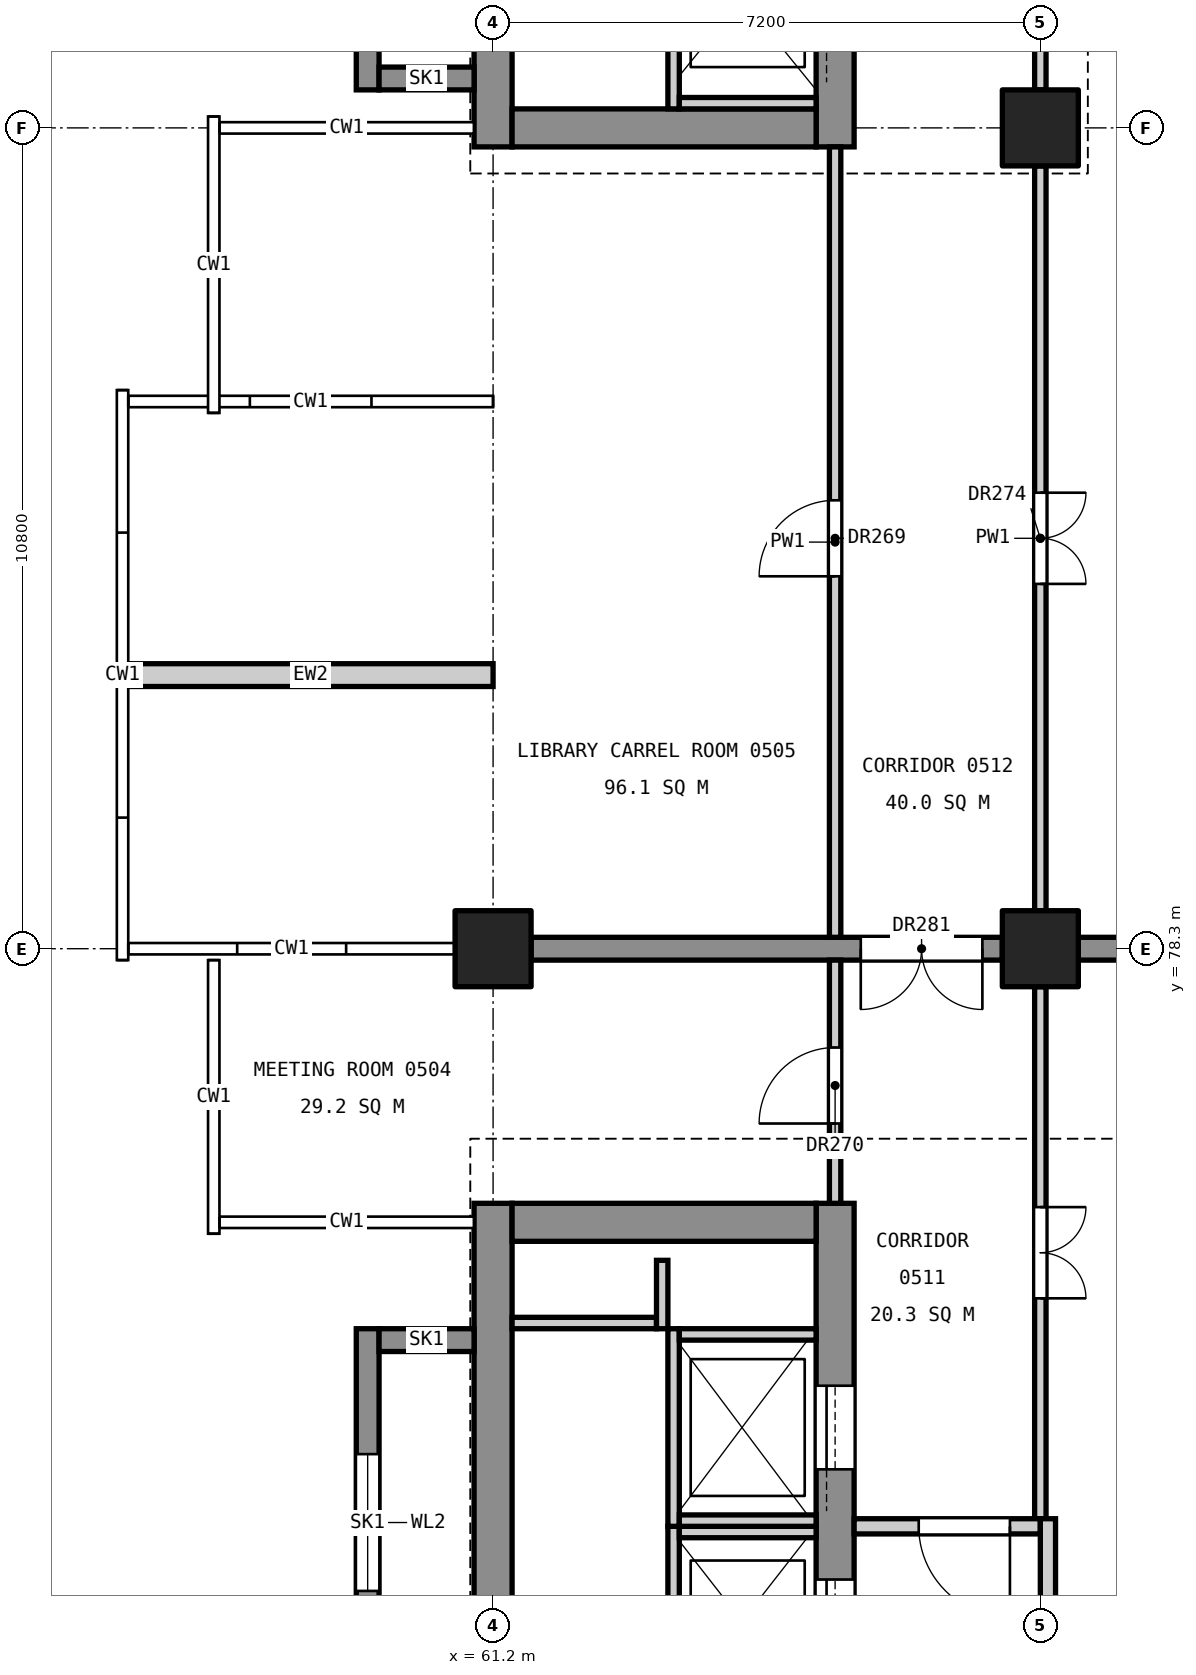
"""IFC4 building model, lengths in metres.
Left out: names, types, materials, properties, quantities, classifications, styles, units other than length and angle.
Written with IfcOpenShell. Run it as: python <this file> out.ifc"""

import sys

from ifc_helpers import new_model, si_unit, direction, frame, frame_2d, origin, origin_2d, place, context, subcontext, project, spatial, rectangle, extrude, element, fill, save


model = new_model("IFC4")
c1 = context("Model", 3, precision=1e-05, world=origin(), true_north=direction((0.0, 1.0)))
c2 = subcontext(c1, "Body", "Model", "MODEL_VIEW")
j1 = project(units=[si_unit("LENGTHUNIT", "METRE"), si_unit("PLANEANGLEUNIT", "RADIAN")], contexts=[c1])
p1 = place(None, origin())
s1 = spatial("IfcSite", under=j1, at=p1, CompositionType="ELEMENT")
p2 = place(p1, origin())
s2 = spatial("IfcBuilding", under=s1, at=p2, CompositionType="ELEMENT")
p3 = place(p2, frame((0.0, 0.0, 27.0)))
s3 = spatial("IfcBuildingStorey", under=s2, at=p3, CompositionType="ELEMENT", Elevation=27.0)
for number, where, z_axis, x_axis in (
    (1, (61.2, 78.3, 0.0), (0.0, 0.0, 1.0), (1.0, 0.0, 0.0)),
    (2, (68.4, 78.3, 0.0), (0.0, 0.0, 1.0), (1.0, 0.0, 0.0)),
    (3, (68.4, 89.1, 0.0), (0.0, 0.0, 1.0), (1.0, 0.0, 0.0)),
):
    element("IfcColumn", number, at=place(p3, frame(where, z_axis=z_axis, x_axis=x_axis)), inside=s3, PredefinedType="COLUMN", context=c2, shape_type="SweptSolid", body=[
        extrude(rectangle(XDim=1.0, YDim=1.0, at=origin_2d()), origin(), (0.0, 0.0, 1.0), 4.8),
    ])
p4 = place(p3, frame((61.2, 60.05, 0.0), z_axis=(0.0, 0.0, 1.0), x_axis=(0.0, 1.0, 0.0)))
e4 = element("IfcWall", 4, at=p4, inside=s3, PredefinedType="SHEAR", context=c2, shape_type="SweptSolid", body=[
    extrude(rectangle(XDim=14.9, YDim=0.5, at=frame_2d((7.45, 0.0))), origin(), (0.0, 0.0, 1.0), 4.55),
])
p5 = place(p4, frame((6.16, 0.0, 3.4)))
e5 = element("IfcOpeningElement", 5, at=p5, cuts=e4, PredefinedType="OPENING", context=c2, shape_type="SweptSolid", body=[
    extrude(rectangle(XDim=1.2, YDim=0.9, at=frame_2d((0.6, 0.45))), frame((0.0, 0.26, 0.0), z_axis=(0.0, -1.0, 0.0), x_axis=(1.0, 0.0, 0.0)), (0.0, 0.0, 1.0), 0.52),
])
p6 = place(p3, frame((65.7, 60.05, 0.0), z_axis=(0.0, 0.0, 1.0), x_axis=(0.0, 1.0, 0.0)))
e6 = element("IfcWall", 6, at=p6, inside=s3, PredefinedType="SHEAR", context=c2, shape_type="SweptSolid", body=[
    extrude(rectangle(XDim=14.9, YDim=0.5, at=frame_2d((7.45, 0.0))), origin(), (0.0, 0.0, 1.0), 4.55),
])
p7 = place(p6, frame((0.55, 0.0, 0.0)))
e7 = element("IfcOpeningElement", 7, at=p7, cuts=e6, PredefinedType="OPENING", context=c2, shape_type="SweptSolid", body=[
    extrude(rectangle(XDim=1.4, YDim=2.1, at=frame_2d((0.7, 1.05))), frame((0.0, 0.26, 0.0), z_axis=(0.0, -1.0, 0.0), x_axis=(1.0, 0.0, 0.0)), (0.0, 0.0, 1.0), 0.52),
])
p8 = place(p6, frame((8.85, 0.0, 0.0)))
e8 = element("IfcOpeningElement", 8, at=p8, cuts=e6, PredefinedType="OPENING", context=c2, shape_type="SweptSolid", body=[
    extrude(rectangle(XDim=1.1, YDim=2.1, at=frame_2d((0.55, 1.05))), frame((0.0, 0.26, 0.0), z_axis=(0.0, -1.0, 0.0), x_axis=(1.0, 0.0, 0.0)), (0.0, 0.0, 1.0), 0.52),
])
p9 = place(p6, frame((11.4, 0.0, 0.0)))
e9 = element("IfcOpeningElement", 9, at=p9, cuts=e6, PredefinedType="OPENING", context=c2, shape_type="SweptSolid", body=[
    extrude(rectangle(XDim=1.1, YDim=2.1, at=frame_2d((0.55, 1.05))), frame((0.0, 0.26, 0.0), z_axis=(0.0, -1.0, 0.0), x_axis=(1.0, 0.0, 0.0)), (0.0, 0.0, 1.0), 0.52),
])
p10 = place(p3, frame((61.45, 74.7, 0.0), z_axis=(0.0, 0.0, 1.0), x_axis=(1.0, 0.0, 0.0)))
e10 = element("IfcWall", 10, at=p10, inside=s3, PredefinedType="SHEAR", context=c2, shape_type="SweptSolid", body=[
    extrude(rectangle(XDim=4.0, YDim=0.5, at=frame_2d((2.0, 0.0))), origin(), (0.0, 0.0, 1.0), 4.55),
])
p11 = place(p3, frame((61.2, 88.85, 0.0), z_axis=(0.0, 0.0, 1.0), x_axis=(0.0, 1.0, 0.0)))
e11 = element("IfcWall", 11, at=p11, inside=s3, PredefinedType="SHEAR", context=c2, shape_type="SweptSolid", body=[
    extrude(rectangle(XDim=11.3, YDim=0.5, at=frame_2d((5.65, 0.0))), origin(), (0.0, 0.0, 1.0), 4.55),
])
p12 = place(p11, frame((3.94, 0.0, 3.4)))
e12 = element("IfcOpeningElement", 12, at=p12, cuts=e11, PredefinedType="OPENING", context=c2, shape_type="SweptSolid", body=[
    extrude(rectangle(XDim=1.2, YDim=0.9, at=frame_2d((0.6, 0.45))), frame((0.0, 0.26, 0.0), z_axis=(0.0, -1.0, 0.0), x_axis=(1.0, 0.0, 0.0)), (0.0, 0.0, 1.0), 0.52),
])
p13 = place(p3, frame((65.7, 88.85, 0.0), z_axis=(0.0, 0.0, 1.0), x_axis=(0.0, 1.0, 0.0)))
e13 = element("IfcWall", 13, at=p13, inside=s3, PredefinedType="SHEAR", context=c2, shape_type="SweptSolid", body=[
    extrude(rectangle(XDim=11.3, YDim=0.5, at=frame_2d((5.65, 0.0))), origin(), (0.0, 0.0, 1.0), 4.55),
])
p14 = place(p13, frame((9.35, 0.0, 0.0)))
e14 = element("IfcOpeningElement", 14, at=p14, cuts=e13, PredefinedType="OPENING", context=c2, shape_type="SweptSolid", body=[
    extrude(rectangle(XDim=1.4, YDim=2.1, at=frame_2d((0.7, 1.05))), frame((0.0, 0.26, 0.0), z_axis=(0.0, -1.0, 0.0), x_axis=(1.0, 0.0, 0.0)), (0.0, 0.0, 1.0), 0.52),
])
p15 = place(p13, frame((1.4, 0.0, 0.0)))
e15 = element("IfcOpeningElement", 15, at=p15, cuts=e13, PredefinedType="OPENING", context=c2, shape_type="SweptSolid", body=[
    extrude(rectangle(XDim=1.1, YDim=2.1, at=frame_2d((0.55, 1.05))), frame((0.0, 0.26, 0.0), z_axis=(0.0, -1.0, 0.0), x_axis=(1.0, 0.0, 0.0)), (0.0, 0.0, 1.0), 0.52),
])
p16 = place(p3, frame((61.45, 89.1, 0.0), z_axis=(0.0, 0.0, 1.0), x_axis=(1.0, 0.0, 0.0)))
e16 = element("IfcWall", 16, at=p16, inside=s3, PredefinedType="SHEAR", context=c2, shape_type="SweptSolid", body=[
    extrude(rectangle(XDim=4.0, YDim=0.5, at=frame_2d((2.0, 0.0))), origin(), (0.0, 0.0, 1.0), 4.55),
])
p17 = place(p3, frame((59.55, 68.2, 0.0), z_axis=(0.0, 0.0, 1.0), x_axis=(0.0, 1.0, 0.0)))
e17 = element("IfcWall", 17, at=p17, inside=s3, PredefinedType="SHEAR", context=c2, shape_type="SweptSolid", body=[
    extrude(rectangle(XDim=5.1, YDim=0.3, at=frame_2d((2.55, 0.0))), origin(), (0.0, 0.0, 1.0), 4.8),
])
p18 = place(p17, frame((1.65, 0.0, 3.0)))
e18 = element("IfcOpeningElement", 18, at=p18, cuts=e17, PredefinedType="OPENING", context=c2, shape_type="SweptSolid", body=[
    extrude(rectangle(XDim=1.8, YDim=1.2, at=frame_2d((0.9, 0.6))), frame((0.0, 0.16, 0.0), z_axis=(0.0, -1.0, 0.0), x_axis=(1.0, 0.0, 0.0)), (0.0, 0.0, 1.0), 0.32),
])
p19 = place(p3, frame((60.95, 73.15, 0.0), z_axis=(0.0, 0.0, 1.0), x_axis=(-1.0, 0.0, 0.0)))
e19 = element("IfcWall", 19, at=p19, inside=s3, PredefinedType="SHEAR", context=c2, shape_type="SweptSolid", body=[
    extrude(rectangle(XDim=1.25, YDim=0.3, at=frame_2d((0.625, 0.0))), origin(), (0.0, 0.0, 1.0), 4.8),
])
p20 = place(p3, frame((59.55, 89.6, 0.0), z_axis=(0.0, 0.0, 1.0), x_axis=(0.0, 1.0, 0.0)))
e20 = element("IfcWall", 20, at=p20, inside=s3, PredefinedType="SHEAR", context=c2, shape_type="SweptSolid", body=[
    extrude(rectangle(XDim=2.4, YDim=0.3, at=frame_2d((1.2, 0.0))), origin(), (0.0, 0.0, 1.0), 4.8),
])
p21 = place(p3, frame((60.95, 89.75, 0.0), z_axis=(0.0, 0.0, 1.0), x_axis=(-1.0, 0.0, 0.0)))
e21 = element("IfcWall", 21, at=p21, inside=s3, PredefinedType="SHEAR", context=c2, shape_type="SweptSolid", body=[
    extrude(rectangle(XDim=1.25, YDim=0.3, at=frame_2d((0.625, 0.0))), origin(), (0.0, 0.0, 1.0), 4.8),
])
p22 = place(p3, frame((61.7, 78.3, 0.0), z_axis=(0.0, 0.0, 1.0), x_axis=(1.0, 0.0, 0.0)))
e22 = element("IfcWall", 22, at=p22, inside=s3, PredefinedType="SHEAR", context=c2, shape_type="SweptSolid", body=[
    extrude(rectangle(XDim=6.2, YDim=0.3, at=frame_2d((3.1, 0.0))), origin(), (0.0, 0.0, 1.0), 4.55),
])
p23 = place(p22, frame((4.337, 0.0, 0.0)))
e23 = element("IfcOpeningElement", 23, at=p23, cuts=e22, PredefinedType="OPENING", context=c2, shape_type="SweptSolid", body=[
    extrude(rectangle(XDim=1.6, YDim=2.1, at=frame_2d((0.8, 1.05))), frame((0.0, 0.16, 0.0), z_axis=(0.0, -1.0, 0.0), x_axis=(1.0, 0.0, 0.0)), (0.0, 0.0, 1.0), 0.32),
])
p24 = place(p3, frame((68.9, 78.3, 0.0), z_axis=(0.0, 0.0, 1.0), x_axis=(1.0, 0.0, 0.0)))
e24 = element("IfcWall", 24, at=p24, inside=s3, PredefinedType="SHEAR", context=c2, shape_type="SweptSolid", body=[
    extrude(rectangle(XDim=9.8, YDim=0.3, at=frame_2d((4.9, 0.0))), origin(), (0.0, 0.0, 1.0), 4.55),
])
p25 = place(p3, frame((63.575, 68.2, 0.0), z_axis=(0.0, 0.0, 1.0), x_axis=(0.0, 1.0, 0.0)))
e25 = element("IfcWall", 25, at=p25, inside=s3, PredefinedType="SOLIDWALL", context=c2, shape_type="SweptSolid", body=[
    extrude(rectangle(XDim=2.5, YDim=0.15, at=frame_2d((1.25, 0.0))), origin(), (0.0, 0.0, 1.0), 4.8),
])
p26 = place(p3, frame((63.65, 70.625, 0.0), z_axis=(0.0, 0.0, 1.0), x_axis=(1.0, 0.0, 0.0)))
e26 = element("IfcWall", 26, at=p26, inside=s3, PredefinedType="SOLIDWALL", context=c2, shape_type="SweptSolid", body=[
    extrude(rectangle(XDim=1.8, YDim=0.15, at=frame_2d((0.9, 0.0))), origin(), (0.0, 0.0, 1.0), 4.8),
])
p27 = place(p3, frame((63.575, 70.7, 0.0), z_axis=(0.0, 0.0, 1.0), x_axis=(0.0, 1.0, 0.0)))
e27 = element("IfcWall", 27, at=p27, inside=s3, PredefinedType="SOLIDWALL", context=c2, shape_type="SweptSolid", body=[
    extrude(rectangle(XDim=2.6, YDim=0.15, at=frame_2d((1.3, 0.0))), origin(), (0.0, 0.0, 1.0), 4.8),
])
for number, where, z_axis, x_axis in (
    (28, (63.65, 70.775, 0.0), (0.0, 0.0, 1.0), (1.0, 0.0, 0.0)),
    (29, (63.65, 73.225, 0.0), (0.0, 0.0, 1.0), (1.0, 0.0, 0.0)),
):
    element("IfcWall", number, at=place(p3, frame(where, z_axis=z_axis, x_axis=x_axis)), inside=s3, PredefinedType="SOLIDWALL", context=c2, shape_type="SweptSolid", body=[
        extrude(rectangle(XDim=1.8, YDim=0.15, at=frame_2d((0.9, 0.0))), origin(), (0.0, 0.0, 1.0), 4.8),
    ])
p28 = place(p3, frame((63.575, 92.0, 0.0), z_axis=(0.0, 0.0, 1.0), x_axis=(0.0, -1.0, 0.0)))
e30 = element("IfcWall", 30, at=p28, inside=s3, PredefinedType="SOLIDWALL", context=c2, shape_type="SweptSolid", body=[
    extrude(rectangle(XDim=2.65, YDim=0.15, at=frame_2d((1.325, 0.0))), origin(), (0.0, 0.0, 1.0), 4.8),
])
p29 = place(p3, frame((63.65, 89.425, 0.0), z_axis=(0.0, 0.0, 1.0), x_axis=(1.0, 0.0, 0.0)))
e31 = element("IfcWall", 31, at=p29, inside=s3, PredefinedType="SOLIDWALL", context=c2, shape_type="SweptSolid", body=[
    extrude(rectangle(XDim=1.8, YDim=0.15, at=frame_2d((0.9, 0.0))), origin(), (0.0, 0.0, 1.0), 4.8),
])
p30 = place(p3, frame((61.45, 73.375, 0.0), z_axis=(0.0, 0.0, 1.0), x_axis=(1.0, 0.0, 0.0)))
e32 = element("IfcWall", 32, at=p30, inside=s3, PredefinedType="SOLIDWALL", context=c2, shape_type="SweptSolid", body=[
    extrude(rectangle(XDim=1.9, YDim=0.15, at=frame_2d((0.95, 0.0))), origin(), (0.0, 0.0, 1.0), 4.8),
])
p31 = place(p3, frame((63.425, 73.3, 0.0), z_axis=(0.0, 0.0, 1.0), x_axis=(0.0, 1.0, 0.0)))
e33 = element("IfcWall", 33, at=p31, inside=s3, PredefinedType="SOLIDWALL", context=c2, shape_type="SweptSolid", body=[
    extrude(rectangle(XDim=0.9, YDim=0.15, at=frame_2d((0.45, 0.0))), origin(), (0.0, 0.0, 1.0), 4.8),
])
p32 = place(p3, frame((56.4, 81.9, 0.0), z_axis=(0.0, 0.0, 1.0), x_axis=(1.0, 0.0, 0.0)))
e34 = element("IfcWall", 34, at=p32, inside=s3, PredefinedType="STANDARD", context=c2, shape_type="SweptSolid", body=[
    extrude(rectangle(XDim=4.8, YDim=0.3, at=frame_2d((2.4, 0.0))), origin(), (0.0, 0.0, 1.0), 3.65),
])
p33 = place(p3, frame((65.7, 74.95, 0.0), z_axis=(0.0, 0.0, 1.0), x_axis=(0.0, 1.0, 0.0)))
e35 = element("IfcWall", 35, at=p33, inside=s3, PredefinedType="PARTITIONING", context=c2, shape_type="SweptSolid", body=[
    extrude(rectangle(XDim=3.2, YDim=0.15, at=frame_2d((1.6, 0.0))), origin(), (0.0, 0.0, 1.0), 3.55),
])
p34 = place(p33, frame((1.05, 0.0, 0.0)))
e36 = element("IfcOpeningElement", 36, at=p34, cuts=e35, PredefinedType="OPENING", context=c2, shape_type="SweptSolid", body=[
    extrude(rectangle(XDim=1.0, YDim=2.1, at=frame_2d((0.5, 1.05))), frame((0.0, 0.085, 0.0), z_axis=(0.0, -1.0, 0.0), x_axis=(1.0, 0.0, 0.0)), (0.0, 0.0, 1.0), 0.17),
])
p35 = place(p3, frame((65.7, 78.45, 0.0), z_axis=(0.0, 0.0, 1.0), x_axis=(0.0, 1.0, 0.0)))
e37 = element("IfcWall", 37, at=p35, inside=s3, PredefinedType="PARTITIONING", context=c2, shape_type="SweptSolid", body=[
    extrude(rectangle(XDim=10.4, YDim=0.15, at=frame_2d((5.2, 0.0))), origin(), (0.0, 0.0, 1.0), 3.55),
])
p36 = place(p35, frame((4.75, 0.0, 0.0)))
e38 = element("IfcOpeningElement", 38, at=p36, cuts=e37, PredefinedType="OPENING", context=c2, shape_type="SweptSolid", body=[
    extrude(rectangle(XDim=1.0, YDim=2.1, at=frame_2d((0.5, 1.05))), frame((0.0, 0.085, 0.0), z_axis=(0.0, -1.0, 0.0), x_axis=(1.0, 0.0, 0.0)), (0.0, 0.0, 1.0), 0.17),
])
p37 = place(p3, frame((68.4, 70.8, 0.0), z_axis=(0.0, 0.0, 1.0), x_axis=(0.0, 1.0, 0.0)))
e39 = element("IfcWall", 39, at=p37, inside=s3, PredefinedType="PARTITIONING", context=c2, shape_type="SweptSolid", body=[
    extrude(rectangle(XDim=7.0, YDim=0.15, at=frame_2d((3.5, 0.0))), origin(), (0.0, 0.0, 1.0), 3.55),
])
p38 = place(p37, frame((2.9, 0.0, 0.0)))
e40 = element("IfcOpeningElement", 40, at=p38, cuts=e39, PredefinedType="OPENING", context=c2, shape_type="SweptSolid", body=[
    extrude(rectangle(XDim=1.2, YDim=2.1, at=frame_2d((0.6, 1.05))), frame((0.0, 0.085, 0.0), z_axis=(0.0, -1.0, 0.0), x_axis=(1.0, 0.0, 0.0)), (0.0, 0.0, 1.0), 0.17),
])
p39 = place(p3, frame((68.4, 78.8, 0.0), z_axis=(0.0, 0.0, 1.0), x_axis=(0.0, 1.0, 0.0)))
e41 = element("IfcWall", 41, at=p39, inside=s3, PredefinedType="PARTITIONING", context=c2, shape_type="SweptSolid", body=[
    extrude(rectangle(XDim=9.8, YDim=0.15, at=frame_2d((4.9, 0.0))), origin(), (0.0, 0.0, 1.0), 3.55),
])
p40 = place(p39, frame((4.3, 0.0, 0.0)))
e42 = element("IfcOpeningElement", 42, at=p40, cuts=e41, PredefinedType="OPENING", context=c2, shape_type="SweptSolid", body=[
    extrude(rectangle(XDim=1.2, YDim=2.1, at=frame_2d((0.6, 1.05))), frame((0.0, 0.085, 0.0), z_axis=(0.0, -1.0, 0.0), x_axis=(1.0, 0.0, 0.0)), (0.0, 0.0, 1.0), 0.17),
])
p41 = place(p3, frame((68.4, 89.6, 0.0), z_axis=(0.0, 0.0, 1.0), x_axis=(0.0, 1.0, 0.0)))
e43 = element("IfcWall", 43, at=p41, inside=s3, PredefinedType="PARTITIONING", context=c2, shape_type="SweptSolid", body=[
    extrude(rectangle(XDim=3.5, YDim=0.15, at=frame_2d((1.75, 0.0))), origin(), (0.0, 0.0, 1.0), 3.55),
])
p42 = place(p3, frame((65.95, 70.7, 0.0), z_axis=(0.0, 0.0, 1.0), x_axis=(1.0, 0.0, 0.0)))
e44 = element("IfcWall", 44, at=p42, inside=s3, PredefinedType="PARTITIONING", context=c2, shape_type="SweptSolid", body=[
    extrude(rectangle(XDim=2.45, YDim=0.2, at=frame_2d((1.225, 0.0))), origin(), (0.0, 0.0, 1.0), 3.55),
])
p43 = place(p42, frame((0.85, 0.0, 0.0)))
e45 = element("IfcOpeningElement", 45, at=p43, cuts=e44, PredefinedType="OPENING", context=c2, shape_type="SweptSolid", body=[
    extrude(rectangle(XDim=1.2, YDim=2.1, at=frame_2d((0.6, 1.05))), frame((0.0, 0.11, 0.0), z_axis=(0.0, -1.0, 0.0), x_axis=(1.0, 0.0, 0.0)), (0.0, 0.0, 1.0), 0.22),
])
p44 = place(p3, frame((68.5, 68.0, 0.0), z_axis=(0.0, 0.0, 1.0), x_axis=(0.0, 1.0, 0.0)))
e46 = element("IfcWall", 46, at=p44, inside=s3, PredefinedType="PARTITIONING", context=c2, shape_type="SweptSolid", body=[
    extrude(rectangle(XDim=2.8, YDim=0.2, at=frame_2d((1.4, 0.0))), origin(), (0.0, 0.0, 1.0), 3.55),
])
p45 = place(p8, origin())
e47 = element("IfcDoor", 47, at=p45, inside=s3, OperationType="SLIDING_TO_LEFT", PredefinedType="DOOR", context=c2, shape_type="SweptSolid", body=[
    extrude(rectangle(XDim=1.1, YDim=2.1, at=frame_2d((0.55, 1.05))), frame((0.0, 0.025, 0.0), z_axis=(0.0, -1.0, 0.0), x_axis=(1.0, 0.0, 0.0)), (0.0, 0.0, 1.0), 0.05),
])
fill(e8, e47)
p46 = place(p9, origin())
e48 = element("IfcDoor", 48, at=p46, inside=s3, OperationType="SLIDING_TO_LEFT", PredefinedType="DOOR", context=c2, shape_type="SweptSolid", body=[
    extrude(rectangle(XDim=1.1, YDim=2.1, at=frame_2d((0.55, 1.05))), frame((0.0, 0.025, 0.0), z_axis=(0.0, -1.0, 0.0), x_axis=(1.0, 0.0, 0.0)), (0.0, 0.0, 1.0), 0.05),
])
fill(e9, e48)
p47 = place(p18, origin())
e49 = element("IfcWindow", 49, at=p47, inside=s3, PartitioningType="SINGLE_PANEL", PredefinedType="WINDOW", context=c2, shape_type="SweptSolid", body=[
    extrude(rectangle(XDim=1.8, YDim=1.2, at=frame_2d((0.9, 0.6))), frame((0.0, 0.03, 0.0), z_axis=(0.0, -1.0, 0.0), x_axis=(1.0, 0.0, 0.0)), (0.0, 0.0, 1.0), 0.06),
])
fill(e18, e49)
p48 = place(p36, origin())
e50 = element("IfcDoor", 50, at=p48, inside=s3, OperationType="SINGLE_SWING_LEFT", PredefinedType="DOOR", context=c2, shape_type="SweptSolid", body=[
    extrude(rectangle(XDim=1.0, YDim=2.1, at=frame_2d((0.5, 1.05))), frame((0.0, 0.025, 0.0), z_axis=(0.0, -1.0, 0.0), x_axis=(1.0, 0.0, 0.0)), (0.0, 0.0, 1.0), 0.05),
])
fill(e38, e50)
p49 = place(p34, origin())
e51 = element("IfcDoor", 51, at=p49, inside=s3, OperationType="SINGLE_SWING_LEFT", PredefinedType="DOOR", context=c2, shape_type="SweptSolid", body=[
    extrude(rectangle(XDim=1.0, YDim=2.1, at=frame_2d((0.5, 1.05))), frame((0.0, 0.025, 0.0), z_axis=(0.0, -1.0, 0.0), x_axis=(1.0, 0.0, 0.0)), (0.0, 0.0, 1.0), 0.05),
])
fill(e36, e51)
p50 = place(p38, frame((1.2, 0.0, 0.0), z_axis=(0.0, 0.0, 1.0), x_axis=(-1.0, 0.0, 0.0)))
e52 = element("IfcDoor", 52, at=p50, inside=s3, OperationType="DOUBLE_DOOR_SINGLE_SWING", PredefinedType="DOOR", context=c2, shape_type="SweptSolid", body=[
    extrude(rectangle(XDim=1.2, YDim=2.1, at=frame_2d((0.6, 1.05))), frame((0.0, 0.025, 0.0), z_axis=(0.0, -1.0, 0.0), x_axis=(1.0, 0.0, 0.0)), (0.0, 0.0, 1.0), 0.05),
])
fill(e40, e52)
p51 = place(p40, frame((1.2, 0.0, 0.0), z_axis=(0.0, 0.0, 1.0), x_axis=(-1.0, 0.0, 0.0)))
e53 = element("IfcDoor", 53, at=p51, inside=s3, OperationType="DOUBLE_DOOR_SINGLE_SWING", PredefinedType="DOOR", context=c2, shape_type="SweptSolid", body=[
    extrude(rectangle(XDim=1.2, YDim=2.1, at=frame_2d((0.6, 1.05))), frame((0.0, 0.025, 0.0), z_axis=(0.0, -1.0, 0.0), x_axis=(1.0, 0.0, 0.0)), (0.0, 0.0, 1.0), 0.05),
])
fill(e42, e53)
p52 = place(p43, frame((1.2, 0.0, 0.0), z_axis=(0.0, 0.0, 1.0), x_axis=(-1.0, 0.0, 0.0)))
e54 = element("IfcDoor", 54, at=p52, inside=s3, OperationType="SINGLE_SWING_LEFT", PredefinedType="DOOR", context=c2, shape_type="SweptSolid", body=[
    extrude(rectangle(XDim=1.2, YDim=2.1, at=frame_2d((0.6, 1.05))), frame((0.0, 0.025, 0.0), z_axis=(0.0, -1.0, 0.0), x_axis=(1.0, 0.0, 0.0)), (0.0, 0.0, 1.0), 0.05),
])
fill(e45, e54)
p53 = place(p23, frame((1.6, 0.0, 0.0), z_axis=(0.0, 0.0, 1.0), x_axis=(-1.0, 0.0, 0.0)))
e55 = element("IfcDoor", 55, at=p53, inside=s3, OperationType="DOUBLE_DOOR_SINGLE_SWING", PredefinedType="DOOR", context=c2, shape_type="SweptSolid", body=[
    extrude(rectangle(XDim=1.6, YDim=2.1, at=frame_2d((0.8, 1.05))), frame((0.0, 0.025, 0.0), z_axis=(0.0, -1.0, 0.0), x_axis=(1.0, 0.0, 0.0)), (0.0, 0.0, 1.0), 0.05),
])
fill(e23, e55)
save(model, sys.argv[1])
